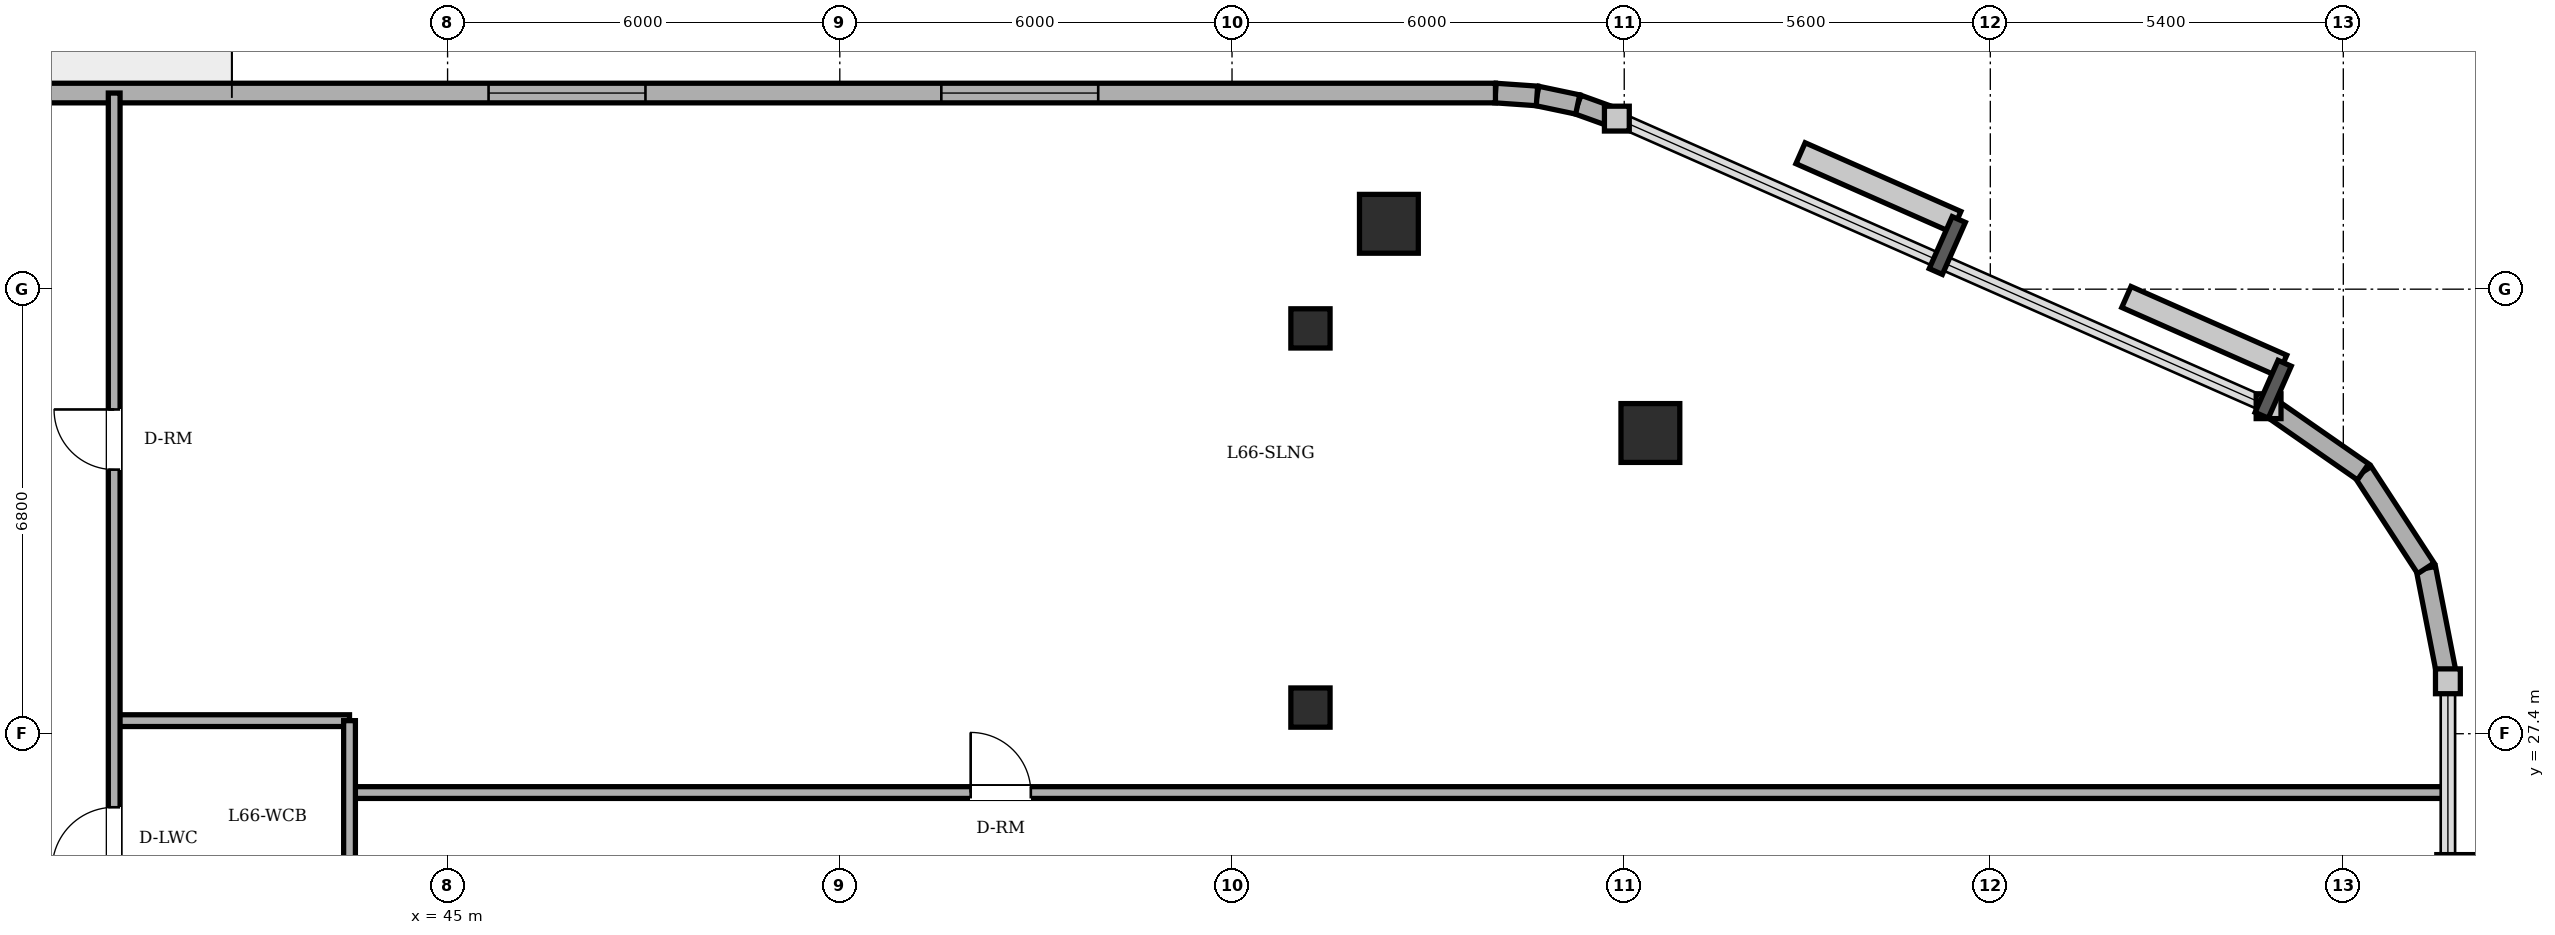
"""IFC4 building model, lengths in metres.
Left out: names, types, materials, properties, quantities, classifications, styles, units other than length and angle.
Written with IfcOpenShell. Run it as: python <this file> out.ifc"""

import sys

from ifc_helpers import new_model, si_unit, direction, frame, frame_2d, origin, origin_2d, place, context, subcontext, project, spatial, rectangle, circle, extrude, element, fill, save


model = new_model("IFC4")
c1 = context("Model", 3, precision=1e-05, world=origin(), true_north=direction((0.0, 1.0)))
c2 = subcontext(c1, "Body", "Model", "MODEL_VIEW")
j1 = project(units=[si_unit("LENGTHUNIT", "METRE"), si_unit("PLANEANGLEUNIT", "RADIAN")], contexts=[c1])
p1 = place(None, origin())
s1 = spatial("IfcSite", under=j1, at=p1, CompositionType="ELEMENT")
p2 = place(p1, origin())
s2 = spatial("IfcBuilding", under=s1, at=p2, CompositionType="ELEMENT")
p3 = place(p2, frame((0.0, 0.0, 253.7)))
s3 = spatial("IfcBuildingStorey", under=s2, at=p3, CompositionType="ELEMENT", Elevation=253.7)
for number, where, z_axis, x_axis in (
    (1, (63.4, 32.0, 0.0), (0.0, 0.0, 1.0), (1.0, 0.0, 0.0)),
    (2, (59.4, 35.2, 0.0), (0.0, 0.0, 1.0), (1.0, 0.0, 0.0)),
):
    element("IfcColumn", number, at=place(p3, frame(where, z_axis=z_axis, x_axis=x_axis)), inside=s3, PredefinedType="COLUMN", context=c2, shape_type="SweptSolid", body=[
        extrude(circle(Radius=0.45, at=origin_2d()), origin(), (0.0, 0.0, 1.0), 5.1),
    ])
for number, where, z_axis, x_axis in (
    (3, (58.2, 27.8, 0.0), (0.0, 0.0, 1.0), (1.0, 0.0, 0.0)),
    (4, (58.2, 33.6, 0.0), (0.0, 0.0, 1.0), (1.0, 0.0, 0.0)),
):
    element("IfcColumn", number, at=place(p3, frame(where, z_axis=z_axis, x_axis=x_axis)), inside=s3, PredefinedType="COLUMN", context=c2, shape_type="SweptSolid", body=[
        extrude(rectangle(XDim=0.6, YDim=0.6, at=origin_2d()), origin(), (0.0, 0.0, 1.0), 5.1),
    ])
for number, where, z_axis, x_axis in (
    (5, (75.6, 28.202, 0.0), (0.0, 0.0, 1.0), (-0.192, 0.981, 0.0)),
    (6, (75.263, 29.93, 0.0), (0.0, 0.0, 1.0), (-0.546, 0.838, 0.0)),
):
    element("IfcWall", number, at=place(p3, frame(where, z_axis=z_axis, x_axis=x_axis)), inside=s3, PredefinedType="SOLIDWALL", context=c2, shape_type="SweptSolid", body=[
        extrude(rectangle(XDim=1.76, YDim=0.3, at=frame_2d((0.88, 0.0))), origin(), (0.0, 0.0, 1.0), 4.9),
    ])
p4 = place(p3, frame((74.302, 31.405, 0.0), z_axis=(0.0, 0.0, 1.0), x_axis=(-0.821006966142, 0.570918174124, 0.0)))
e7 = element("IfcWall", 7, at=p4, inside=s3, PredefinedType="SOLIDWALL", context=c2, shape_type="SweptSolid", body=[
    extrude(rectangle(XDim=1.76, YDim=0.3, at=frame_2d((0.88, 0.0))), origin(), (0.0, 0.0, 1.0), 4.9),
])
p5 = place(p3, frame((62.887, 36.809, 0.0), z_axis=(0.0, 0.0, 1.0), x_axis=(-0.94077491148, 0.339031806665, 0.0)))
e8 = element("IfcWall", 8, at=p5, inside=s3, PredefinedType="SOLIDWALL", context=c2, shape_type="SweptSolid", body=[
    extrude(rectangle(XDim=0.636, YDim=0.3, at=frame_2d((0.318, 0.0))), origin(), (0.0, 0.0, 1.0), 4.9),
])
p6 = place(p3, frame((62.288, 37.025, 0.0), z_axis=(0.0, 0.0, 1.0), x_axis=(-0.97857012251, 0.205913854149, 0.0)))
e9 = element("IfcWall", 9, at=p6, inside=s3, PredefinedType="SOLIDWALL", context=c2, shape_type="SweptSolid", body=[
    extrude(rectangle(XDim=0.637, YDim=0.3, at=frame_2d((0.318, 0.0))), origin(), (0.0, 0.0, 1.0), 4.9),
])
p7 = place(p3, frame((61.665, 37.156, 0.0), z_axis=(0.0, 0.0, 1.0), x_axis=(-0.997613959688, 0.069039028352, 0.0)))
e10 = element("IfcWall", 10, at=p7, inside=s3, PredefinedType="SOLIDWALL", context=c2, shape_type="SweptSolid", body=[
    extrude(rectangle(XDim=0.636, YDim=0.3, at=frame_2d((0.318, 0.0))), origin(), (0.0, 0.0, 1.0), 4.9),
])
p8 = place(p3, frame((61.03, 37.2, 0.0), z_axis=(0.0, 0.0, 1.0), x_axis=(-1.0, 0.0, 0.0)))
e11 = element("IfcWall", 11, at=p8, inside=s3, PredefinedType="SOLIDWALL", context=c2, shape_type="SweptSolid", body=[
    extrude(rectangle(XDim=37.03, YDim=0.3, at=frame_2d((18.515, 0.0))), origin(), (0.0, 0.0, 1.0), 4.9),
])
p9 = place(p8, frame((29.355, 0.0, 0.0)))
e12 = element("IfcOpeningElement", 12, at=p9, cuts=e11, PredefinedType="OPENING", context=c2, shape_type="SweptSolid", body=[
    extrude(rectangle(XDim=0.95, YDim=2.2, at=frame_2d((0.475, 1.1))), frame((0.0, 0.16, 0.0), z_axis=(0.0, -1.0, 0.0), x_axis=(1.0, 0.0, 0.0)), (0.0, 0.0, 1.0), 0.32),
])
p10 = place(p8, frame((6.077, 0.0, 0.85)))
e13 = element("IfcOpeningElement", 13, at=p10, cuts=e11, PredefinedType="OPENING", context=c2, shape_type="SweptSolid", body=[
    extrude(rectangle(XDim=2.4, YDim=2.1, at=frame_2d((1.2, 1.05))), frame((0.0, 0.16, 0.0), z_axis=(0.0, -1.0, 0.0), x_axis=(1.0, 0.0, 0.0)), (0.0, 0.0, 1.0), 0.32),
])
p11 = place(p8, frame((13.003, 0.0, 0.85)))
e14 = element("IfcOpeningElement", 14, at=p11, cuts=e11, PredefinedType="OPENING", context=c2, shape_type="SweptSolid", body=[
    extrude(rectangle(XDim=2.4, YDim=2.1, at=frame_2d((1.2, 1.05))), frame((0.0, 0.16, 0.0), z_axis=(0.0, -1.0, 0.0), x_axis=(1.0, 0.0, 0.0)), (0.0, 0.0, 1.0), 0.32),
])
p12 = place(p8, frame((25.113, 0.0, 0.85)))
e15 = element("IfcOpeningElement", 15, at=p12, cuts=e11, PredefinedType="OPENING", context=c2, shape_type="SweptSolid", body=[
    extrude(rectangle(XDim=2.4, YDim=2.1, at=frame_2d((1.2, 1.05))), frame((0.0, 0.16, 0.0), z_axis=(0.0, -1.0, 0.0), x_axis=(1.0, 0.0, 0.0)), (0.0, 0.0, 1.0), 0.32),
])
p13 = place(p3, frame((43.5, 26.5, 0.0), z_axis=(0.0, 0.0, 1.0), x_axis=(1.0, 0.0, 0.0)))
e16 = element("IfcWall", 16, at=p13, inside=s3, PredefinedType="PARTITIONING", context=c2, shape_type="SweptSolid", body=[
    extrude(rectangle(XDim=32.1, YDim=0.18, at=frame_2d((16.05, 0.0))), origin(), (0.0, 0.0, 1.0), 4.9),
])
p14 = place(p13, frame((9.502, 0.0, 0.0)))
e17 = element("IfcOpeningElement", 17, at=p14, cuts=e16, PredefinedType="OPENING", context=c2, shape_type="SweptSolid", body=[
    extrude(rectangle(XDim=0.92, YDim=2.1, at=frame_2d((0.46, 1.05))), frame((0.0, 0.1, 0.0), z_axis=(0.0, -1.0, 0.0), x_axis=(1.0, 0.0, 0.0)), (0.0, 0.0, 1.0), 0.2),
])
p15 = place(p3, frame((39.9, 27.6, 0.0), z_axis=(0.0, 0.0, 1.0), x_axis=(1.0, 0.0, 0.0)))
e18 = element("IfcWall", 18, at=p15, inside=s3, PredefinedType="PARTITIONING", context=c2, shape_type="SweptSolid", body=[
    extrude(rectangle(XDim=3.6, YDim=0.18, at=frame_2d((1.8, 0.0))), origin(), (0.0, 0.0, 1.0), 4.542),
])
p16 = place(p3, frame((39.9, 18.65, 0.0), z_axis=(0.0, 0.0, 1.0), x_axis=(0.0, 1.0, 0.0)))
e19 = element("IfcWall", 19, at=p16, inside=s3, PredefinedType="PARTITIONING", context=c2, shape_type="SweptSolid", body=[
    extrude(rectangle(XDim=18.55, YDim=0.18, at=frame_2d((9.275, 0.0))), origin(), (0.0, 0.0, 1.0), 4.9),
])
p17 = place(p16, frame((3.375, 0.0, 0.0)))
e20 = element("IfcOpeningElement", 20, at=p17, cuts=e19, PredefinedType="OPENING", context=c2, shape_type="SweptSolid", body=[
    extrude(rectangle(XDim=0.95, YDim=2.15, at=frame_2d((0.475, 1.075))), frame((0.0, 0.1, 0.0), z_axis=(0.0, -1.0, 0.0), x_axis=(1.0, 0.0, 0.0)), (0.0, 0.0, 1.0), 0.2),
])
p18 = place(p16, frame((6.675, 0.0, 0.0)))
e21 = element("IfcOpeningElement", 21, at=p18, cuts=e19, PredefinedType="OPENING", context=c2, shape_type="SweptSolid", body=[
    extrude(rectangle(XDim=0.95, YDim=2.15, at=frame_2d((0.475, 1.075))), frame((0.0, 0.1, 0.0), z_axis=(0.0, -1.0, 0.0), x_axis=(1.0, 0.0, 0.0)), (0.0, 0.0, 1.0), 0.2),
])
p19 = place(p16, frame((12.79, 0.0, 0.0)))
e22 = element("IfcOpeningElement", 22, at=p19, cuts=e19, PredefinedType="OPENING", context=c2, shape_type="SweptSolid", body=[
    extrude(rectangle(XDim=0.92, YDim=2.1, at=frame_2d((0.46, 1.05))), frame((0.0, 0.1, 0.0), z_axis=(0.0, -1.0, 0.0), x_axis=(1.0, 0.0, 0.0)), (0.0, 0.0, 1.0), 0.2),
])
p20 = place(p3, frame((43.5, 20.8, 0.0), z_axis=(0.0, 0.0, 1.0), x_axis=(0.0, 1.0, 0.0)))
e23 = element("IfcWall", 23, at=p20, inside=s3, PredefinedType="PARTITIONING", context=c2, shape_type="SweptSolid", body=[
    extrude(rectangle(XDim=6.8, YDim=0.18, at=frame_2d((3.4, 0.0))), origin(), (0.0, 0.0, 1.0), 4.9),
])
p21 = place(p10, origin())
e24 = element("IfcWindow", 24, at=p21, inside=s3, PartitioningType="TRIPLE_PANEL_VERTICAL", PredefinedType="WINDOW", context=c2, shape_type="SweptSolid", body=[
    extrude(rectangle(XDim=2.4, YDim=2.1, at=frame_2d((1.2, 1.05))), frame((0.0, 0.03, 0.0), z_axis=(0.0, -1.0, 0.0), x_axis=(1.0, 0.0, 0.0)), (0.0, 0.0, 1.0), 0.06),
])
fill(e13, e24)
p22 = place(p11, origin())
e25 = element("IfcWindow", 25, at=p22, inside=s3, PartitioningType="TRIPLE_PANEL_VERTICAL", PredefinedType="WINDOW", context=c2, shape_type="SweptSolid", body=[
    extrude(rectangle(XDim=2.4, YDim=2.1, at=frame_2d((1.2, 1.05))), frame((0.0, 0.03, 0.0), z_axis=(0.0, -1.0, 0.0), x_axis=(1.0, 0.0, 0.0)), (0.0, 0.0, 1.0), 0.06),
])
fill(e14, e25)
p23 = place(p18, origin())
e26 = element("IfcDoor", 26, at=p23, inside=s3, OperationType="SINGLE_SWING_LEFT", PredefinedType="DOOR", context=c2, shape_type="SweptSolid", body=[
    extrude(rectangle(XDim=0.95, YDim=2.15, at=frame_2d((0.475, 1.075))), frame((0.0, 0.025, 0.0), z_axis=(0.0, -1.0, 0.0), x_axis=(1.0, 0.0, 0.0)), (0.0, 0.0, 1.0), 0.05),
])
fill(e21, e26)
p24 = place(p19, origin())
e27 = element("IfcDoor", 27, at=p24, inside=s3, OperationType="SINGLE_SWING_RIGHT", PredefinedType="DOOR", context=c2, shape_type="SweptSolid", body=[
    extrude(rectangle(XDim=0.92, YDim=2.1, at=frame_2d((0.46, 1.05))), frame((0.0, 0.025, 0.0), z_axis=(0.0, -1.0, 0.0), x_axis=(1.0, 0.0, 0.0)), (0.0, 0.0, 1.0), 0.05),
])
fill(e22, e27)
p25 = place(p14, origin())
e28 = element("IfcDoor", 28, at=p25, inside=s3, OperationType="SINGLE_SWING_LEFT", PredefinedType="DOOR", context=c2, shape_type="SweptSolid", body=[
    extrude(rectangle(XDim=0.92, YDim=2.1, at=frame_2d((0.46, 1.05))), frame((0.0, 0.025, 0.0), z_axis=(0.0, -1.0, 0.0), x_axis=(1.0, 0.0, 0.0)), (0.0, 0.0, 1.0), 0.05),
])
fill(e17, e28)
save(model, sys.argv[1])
